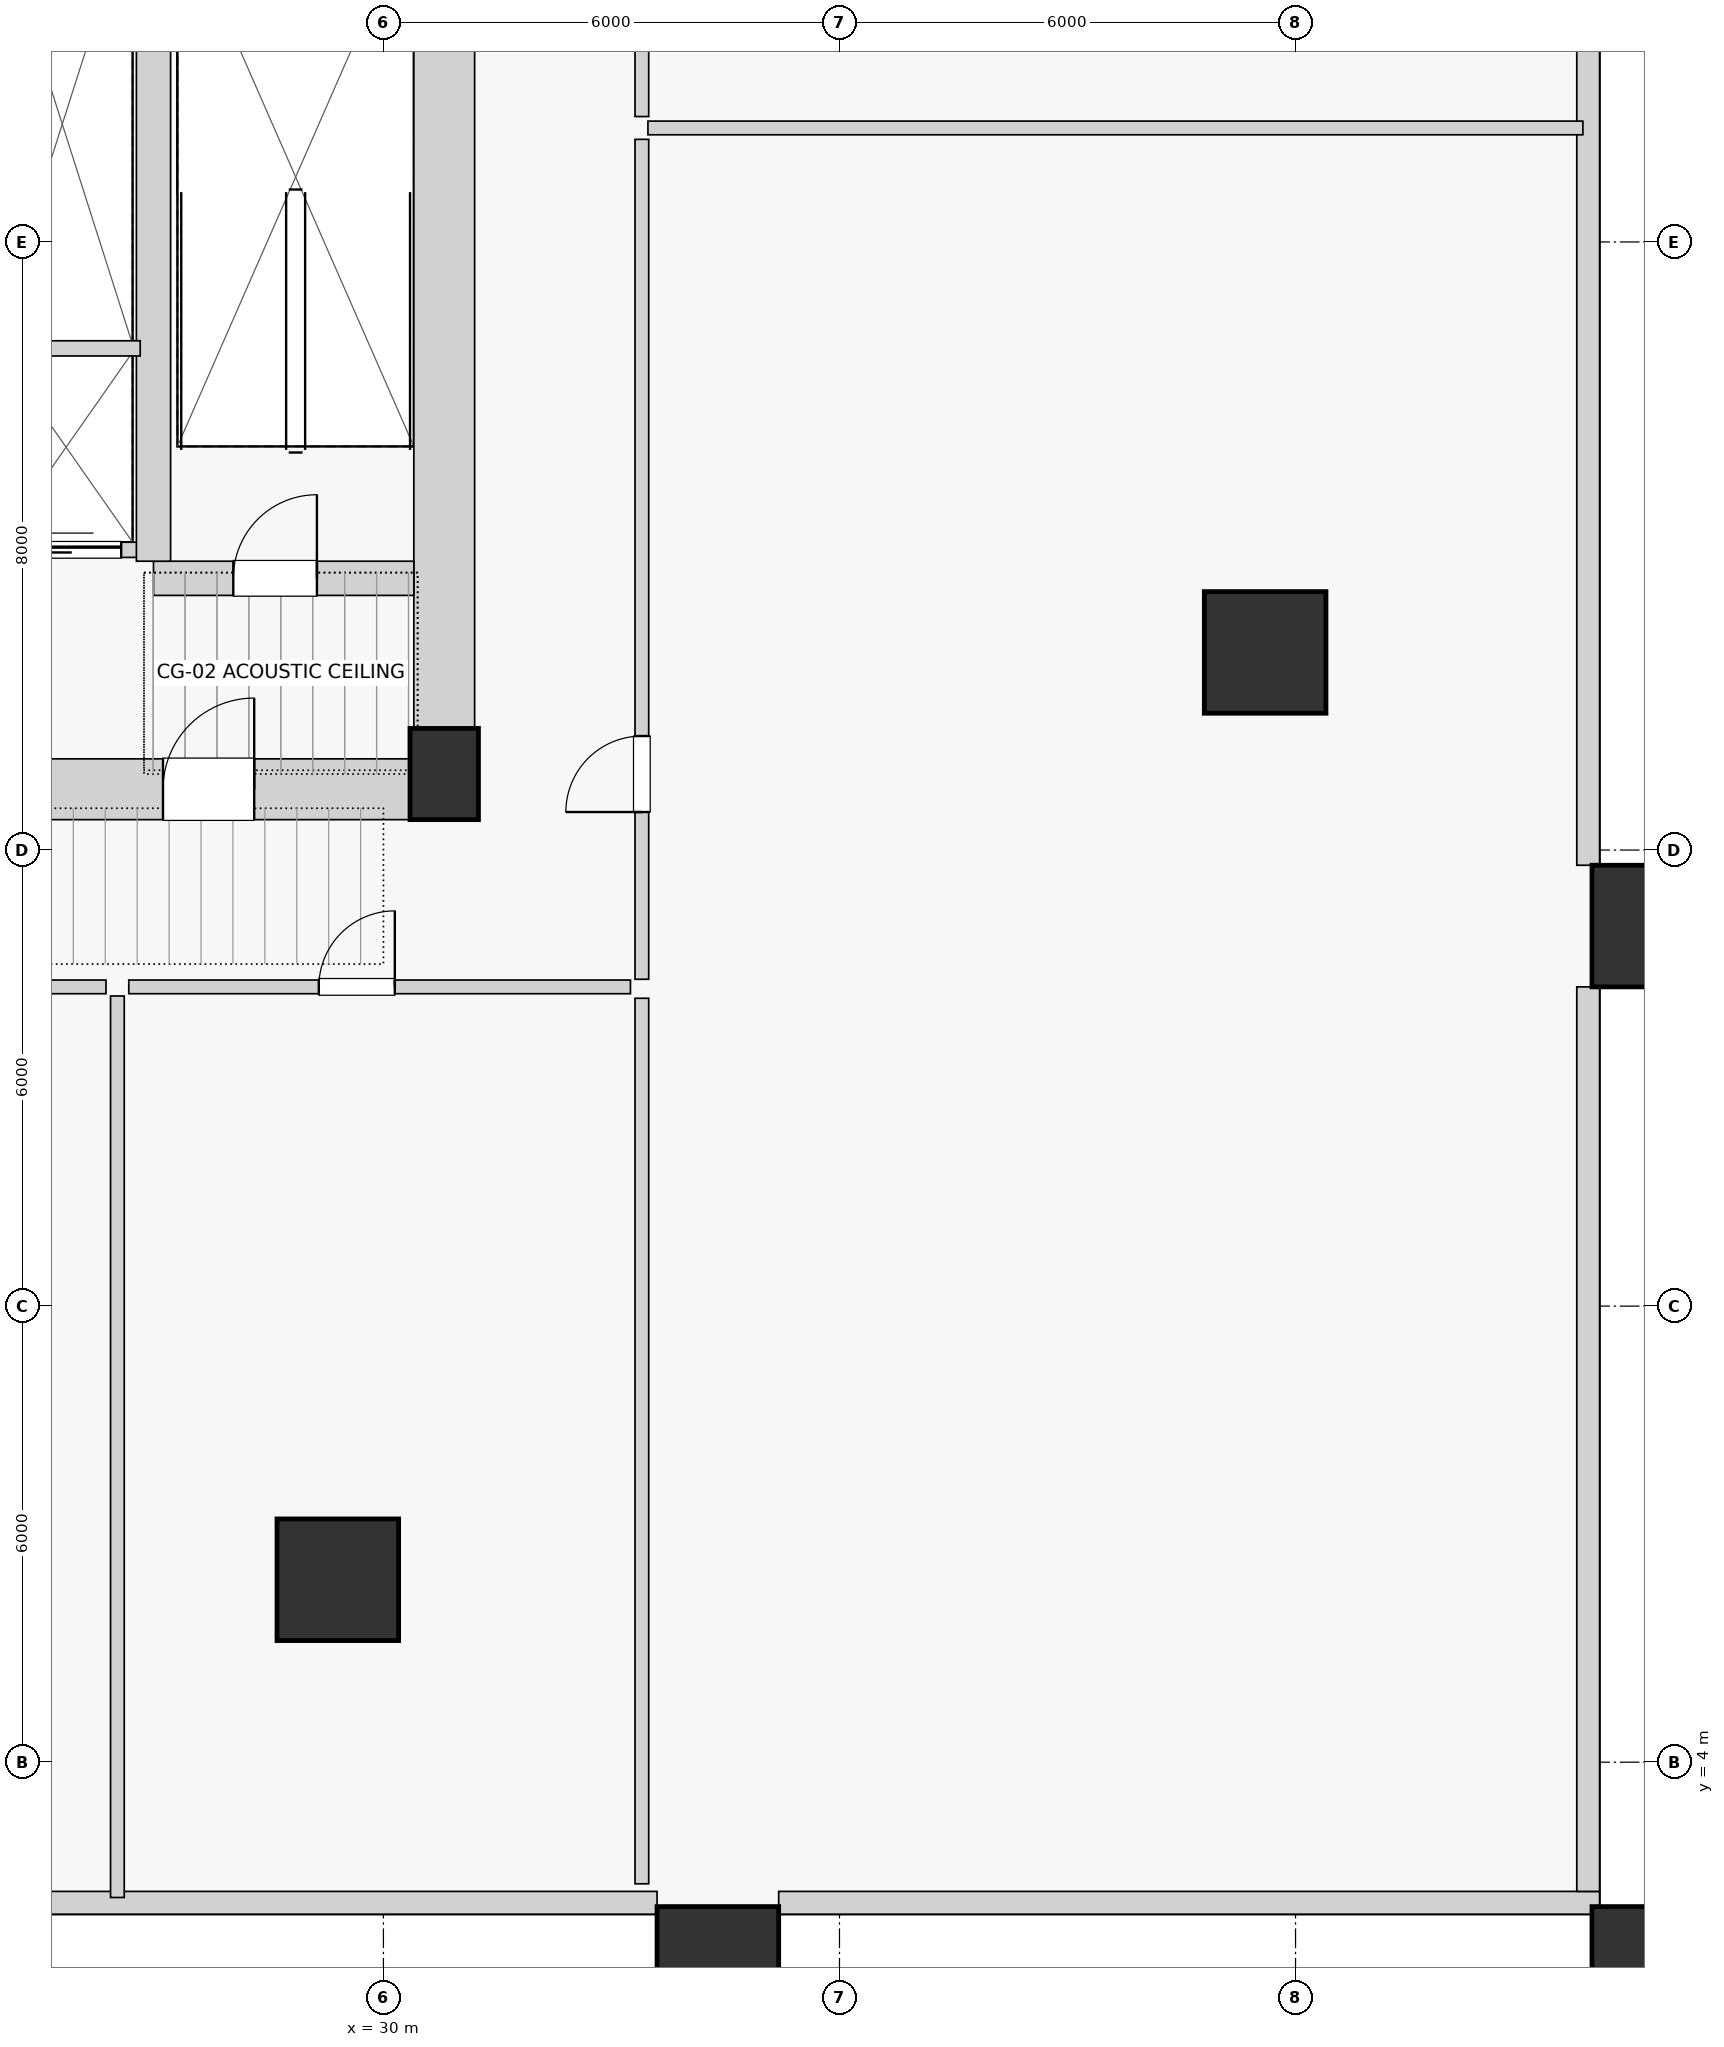
"""IFC4 building model, lengths in metres.
Left out: names, types, materials, properties, quantities, classifications, styles, units other than length and angle.
Written with IfcOpenShell. Run it as: python <this file> out.ifc"""

import sys

from ifc_helpers import new_model, si_unit, direction, frame, frame_2d, origin, origin_2d, place, context, subcontext, project, spatial, rectangle, extrude, source, transform, mapped, element, fill, save


model = new_model("IFC4")
c1 = context("Model", 3, precision=1e-05, world=origin(), true_north=direction((0.0, 1.0)))
c2 = subcontext(c1, "Body", "Model", "MODEL_VIEW")
j1 = project(units=[si_unit("LENGTHUNIT", "METRE"), si_unit("PLANEANGLEUNIT", "RADIAN")], contexts=[c1])
p1 = place(None, origin())
s1 = spatial("IfcSite", under=j1, at=p1, CompositionType="ELEMENT")
p2 = place(p1, origin())
s2 = spatial("IfcBuilding", under=s1, at=p2, CompositionType="ELEMENT")
p3 = place(p2, frame((0.0, 0.0, 18.4)))
s3 = spatial("IfcBuildingStorey", under=s2, at=p3, CompositionType="ELEMENT", Elevation=18.4)
p4 = place(p3, frame((30.8, 17.0, 0.0), z_axis=(0.0, 0.0, 1.0), x_axis=(1.0, 0.0, 0.0)))
e1 = element("IfcColumn", 1, at=p4, inside=s3, PredefinedType="PILASTER", context=c2, shape_type="SweptSolid", body=[
    extrude(rectangle(XDim=0.9, YDim=1.2, at=origin_2d()), origin(), (0.0, 0.0, 1.0), 4.4),
])
for number, where, z_axis, x_axis in (
    (2, (34.4, 1.3, 0.0), (0.0, 0.0, 1.0), (1.0, 0.0, 0.0)),
    (3, (46.7, 1.3, 0.0), (0.0, 0.0, 1.0), (1.0, 0.0, 0.0)),
    (4, (46.7, 15.0, 0.0), (0.0, 0.0, 1.0), (1.0, 0.0, 0.0)),
    (5, (41.6, 18.6, 0.0), (0.0, 0.0, 1.0), (1.0, 0.0, 0.0)),
    (6, (29.4, 6.4, 0.0), (0.0, 0.0, 1.0), (1.0, 0.0, 0.0)),
):
    element("IfcColumn", number, at=place(p3, frame(where, z_axis=z_axis, x_axis=x_axis)), inside=s3, PredefinedType="COLUMN", context=c2, shape_type="SweptSolid", body=[
        extrude(rectangle(XDim=1.6, YDim=1.6, at=origin_2d()), origin(), (0.0, 0.0, 1.0), 4.4),
    ])
p5 = place(p3, frame((24.8, 2.15, 0.0), z_axis=(0.0, 0.0, 1.0), x_axis=(1.0, 0.0, 0.0)))
e7 = element("IfcWall", 7, at=p5, inside=s3, PredefinedType="SOLIDWALL", context=c2, shape_type="SweptSolid", body=[
    extrude(rectangle(XDim=8.8, YDim=0.3, at=frame_2d((4.4, 0.0))), origin(), (0.0, 0.0, 1.0), 2.95),
])
p6 = place(p5, frame((3.35, 0.0, 0.85)))
e8 = element("IfcOpeningElement", 8, at=p6, cuts=e7, PredefinedType="OPENING", context=c2, shape_type="SweptSolid", body=[
    extrude(rectangle(XDim=2.1, YDim=1.75, at=frame_2d((1.05, 0.875))), frame((0.0, 0.16, 0.0), z_axis=(0.0, -1.0, 0.0), x_axis=(1.0, 0.0, 0.0)), (0.0, 0.0, 1.0), 0.32),
])
p7 = place(p3, frame((35.2, 2.15, 0.0), z_axis=(0.0, 0.0, 1.0), x_axis=(1.0, 0.0, 0.0)))
e9 = element("IfcWall", 9, at=p7, inside=s3, PredefinedType="SOLIDWALL", context=c2, shape_type="SweptSolid", body=[
    extrude(rectangle(XDim=10.8, YDim=0.3, at=frame_2d((5.4, 0.0))), origin(), (0.0, 0.0, 1.0), 2.95),
])
p8 = place(p7, frame((4.05, 0.0, 0.85)))
e10 = element("IfcOpeningElement", 10, at=p8, cuts=e9, PredefinedType="OPENING", context=c2, shape_type="SweptSolid", body=[
    extrude(rectangle(XDim=2.1, YDim=1.75, at=frame_2d((1.05, 0.875))), frame((0.0, 0.16, 0.0), z_axis=(0.0, -1.0, 0.0), x_axis=(1.0, 0.0, 0.0)), (0.0, 0.0, 1.0), 0.32),
])
p9 = place(p3, frame((45.85, 2.3, 0.0), z_axis=(0.0, 0.0, 1.0), x_axis=(0.0, 1.0, 0.0)))
e11 = element("IfcWall", 11, at=p9, inside=s3, PredefinedType="SOLIDWALL", context=c2, shape_type="SweptSolid", body=[
    extrude(rectangle(XDim=11.9, YDim=0.3, at=frame_2d((5.95, 0.0))), origin(), (0.0, 0.0, 1.0), 2.95),
])
p10 = place(p9, frame((5.05, 0.0, 0.85)))
e12 = element("IfcOpeningElement", 12, at=p10, cuts=e11, PredefinedType="OPENING", context=c2, shape_type="SweptSolid", body=[
    extrude(rectangle(XDim=2.1, YDim=1.75, at=frame_2d((1.05, 0.875))), frame((0.0, 0.16, 0.0), z_axis=(0.0, -1.0, 0.0), x_axis=(1.0, 0.0, 0.0)), (0.0, 0.0, 1.0), 0.32),
])
p11 = place(p3, frame((45.85, 15.8, 0.0), z_axis=(0.0, 0.0, 1.0), x_axis=(0.0, 1.0, 0.0)))
e13 = element("IfcWall", 13, at=p11, inside=s3, PredefinedType="SOLIDWALL", context=c2, shape_type="SweptSolid", body=[
    extrude(rectangle(XDim=16.4, YDim=0.3, at=frame_2d((8.2, 0.0))), origin(), (0.0, 0.0, 1.0), 2.95),
])
p12 = place(p11, frame((7.15, 0.0, 0.85)))
e14 = element("IfcOpeningElement", 14, at=p12, cuts=e13, PredefinedType="OPENING", context=c2, shape_type="SweptSolid", body=[
    extrude(rectangle(XDim=2.1, YDim=1.75, at=frame_2d((1.05, 0.875))), frame((0.0, 0.16, 0.0), z_axis=(0.0, -1.0, 0.0), x_axis=(1.0, 0.0, 0.0)), (0.0, 0.0, 1.0), 0.32),
])
p13 = place(p3, frame((30.8, 16.8, 0.0), z_axis=(0.0, 0.0, 1.0), x_axis=(0.0, 1.0, 0.0)))
e15 = element("IfcWall", 15, at=p13, inside=s3, PredefinedType="SHEAR", context=c2, shape_type="SweptSolid", body=[
    extrude(rectangle(XDim=14.2, YDim=0.8, at=frame_2d((7.1, 0.0))), origin(), (0.0, 0.0, 1.0), 4.05),
])
p14 = place(p3, frame((24.95, 16.8, 0.0), z_axis=(0.0, 0.0, 1.0), x_axis=(1.0, 0.0, 0.0)))
e16 = element("IfcWall", 16, at=p14, inside=s3, PredefinedType="SHEAR", context=c2, shape_type="SweptSolid", body=[
    extrude(rectangle(XDim=5.85, YDim=0.8, at=frame_2d((2.925, 0.0))), origin(), (0.0, 0.0, 1.0), 4.05),
])
p15 = place(p14, frame((2.15, 0.0, 0.0)))
e17 = element("IfcOpeningElement", 17, at=p15, cuts=e16, PredefinedType="OPENING", context=c2, shape_type="SweptSolid", body=[
    extrude(rectangle(XDim=1.2, YDim=2.03, at=frame_2d((0.6, 1.015))), frame((0.0, 0.41, 0.0), z_axis=(0.0, -1.0, 0.0), x_axis=(1.0, 0.0, 0.0)), (0.0, 0.0, 1.0), 0.82),
])
p16 = place(p3, frame((24.95, 19.95, 0.0), z_axis=(0.0, 0.0, 1.0), x_axis=(1.0, 0.0, 0.0)))
e18 = element("IfcWall", 18, at=p16, inside=s3, PredefinedType="SOLIDWALL", context=c2, shape_type="SweptSolid", body=[
    extrude(rectangle(XDim=1.85, YDim=0.2, at=frame_2d((0.925, 0.0))), origin(), (0.0, 0.0, 1.0), 4.05),
])
p17 = place(p16, frame((0.3, 0.0, 0.0)))
e19 = element("IfcOpeningElement", 19, at=p17, cuts=e18, PredefinedType="OPENING", context=c2, shape_type="SweptSolid", body=[
    extrude(rectangle(XDim=1.3, YDim=2.25, at=frame_2d((0.65, 1.125))), frame((0.0, 0.11, 0.0), z_axis=(0.0, -1.0, 0.0), x_axis=(1.0, 0.0, 0.0)), (0.0, 0.0, 1.0), 0.22),
])
p18 = place(p3, frame((26.975, 19.575, 0.0), z_axis=(0.0, 0.0, 1.0), x_axis=(1.0, 0.0, 0.0)))
e20 = element("IfcWall", 20, at=p18, inside=s3, PredefinedType="SHEAR", context=c2, shape_type="SweptSolid", body=[
    extrude(rectangle(XDim=3.425, YDim=0.45, at=frame_2d((1.712, 0.0))), origin(), (0.0, 0.0, 1.0), 4.05),
])
p19 = place(p18, frame((1.05, 0.0, 0.0)))
e21 = element("IfcOpeningElement", 21, at=p19, cuts=e20, PredefinedType="OPENING", context=c2, shape_type="SweptSolid", body=[
    extrude(rectangle(XDim=1.1, YDim=2.03, at=frame_2d((0.55, 1.015))), frame((0.0, 0.235, 0.0), z_axis=(0.0, -1.0, 0.0), x_axis=(1.0, 0.0, 0.0)), (0.0, 0.0, 1.0), 0.47),
])
p20 = place(p3, frame((26.975, 19.8, 0.0), z_axis=(0.0, 0.0, 1.0), x_axis=(0.0, 1.0, 0.0)))
e22 = element("IfcWall", 22, at=p20, inside=s3, PredefinedType="SHEAR", context=c2, shape_type="SweptSolid", body=[
    extrude(rectangle(XDim=8.825, YDim=0.45, at=frame_2d((4.413, 0.0))), origin(), (0.0, 0.0, 1.0), 4.05),
])
p21 = place(p3, frame((24.85, 22.6, 0.0), z_axis=(0.0, 0.0, 1.0), x_axis=(1.0, 0.0, 0.0)))
e23 = element("IfcWall", 23, at=p21, inside=s3, PredefinedType="SOLIDWALL", context=c2, shape_type="SweptSolid", body=[
    extrude(rectangle(XDim=1.95, YDim=0.2, at=frame_2d((0.975, 0.0))), origin(), (0.0, 0.0, 1.0), 4.05),
])
p22 = place(p3, frame((14.75, 14.2, 0.0), z_axis=(0.0, 0.0, 1.0), x_axis=(1.0, 0.0, 0.0)))
e24 = element("IfcWall", 24, at=p22, inside=s3, PredefinedType="PARTITIONING", context=c2, shape_type="SweptSolid", body=[
    extrude(rectangle(XDim=11.6, YDim=0.18, at=frame_2d((5.8, 0.0))), origin(), (0.0, 0.0, 1.0), 4.05),
])
p23 = place(p22, frame((2.5, 0.0, 0.0)))
e25 = element("IfcOpeningElement", 25, at=p23, cuts=e24, PredefinedType="OPENING", context=c2, shape_type="SweptSolid", body=[
    extrude(rectangle(XDim=1.0, YDim=2.01, at=frame_2d((0.5, 1.005))), frame((0.0, 0.1, 0.0), z_axis=(0.0, -1.0, 0.0), x_axis=(1.0, 0.0, 0.0)), (0.0, 0.0, 1.0), 0.2),
])
p24 = place(p3, frame((26.65, 14.2, 0.0), z_axis=(0.0, 0.0, 1.0), x_axis=(1.0, 0.0, 0.0)))
e26 = element("IfcWall", 26, at=p24, inside=s3, PredefinedType="PARTITIONING", context=c2, shape_type="SweptSolid", body=[
    extrude(rectangle(XDim=6.6, YDim=0.18, at=frame_2d((3.3, 0.0))), origin(), (0.0, 0.0, 1.0), 4.05),
])
p25 = place(p24, frame((2.5, 0.0, 0.0)))
e27 = element("IfcOpeningElement", 27, at=p25, cuts=e26, PredefinedType="OPENING", context=c2, shape_type="SweptSolid", body=[
    extrude(rectangle(XDim=1.0, YDim=2.01, at=frame_2d((0.5, 1.005))), frame((0.0, 0.1, 0.0), z_axis=(0.0, -1.0, 0.0), x_axis=(1.0, 0.0, 0.0)), (0.0, 0.0, 1.0), 0.2),
])
p26 = place(p3, frame((26.5, 2.22, 0.0), z_axis=(0.0, 0.0, 1.0), x_axis=(0.0, 1.0, 0.0)))
e28 = element("IfcWall", 28, at=p26, inside=s3, PredefinedType="PARTITIONING", context=c2, shape_type="SweptSolid", body=[
    extrude(rectangle(XDim=11.86, YDim=0.18, at=frame_2d((5.93, 0.0))), origin(), (0.0, 0.0, 1.0), 4.05),
])
p27 = place(p3, frame((33.4, 2.4, 0.0), z_axis=(0.0, 0.0, 1.0), x_axis=(0.0, 1.0, 0.0)))
e29 = element("IfcWall", 29, at=p27, inside=s3, PredefinedType="PARTITIONING", context=c2, shape_type="SweptSolid", body=[
    extrude(rectangle(XDim=11.65, YDim=0.18, at=frame_2d((5.825, 0.0))), origin(), (0.0, 0.0, 1.0), 4.05),
])
p28 = place(p3, frame((33.4, 14.3, 0.0), z_axis=(0.0, 0.0, 1.0), x_axis=(0.0, 1.0, 0.0)))
e30 = element("IfcWall", 30, at=p28, inside=s3, PredefinedType="PARTITIONING", context=c2, shape_type="SweptSolid", body=[
    extrude(rectangle(XDim=11.05, YDim=0.18, at=frame_2d((5.525, 0.0))), origin(), (0.0, 0.0, 1.0), 4.05),
])
p29 = place(p28, frame((2.2, 0.0, 0.0)))
e31 = element("IfcOpeningElement", 31, at=p29, cuts=e30, PredefinedType="OPENING", context=c2, shape_type="SweptSolid", body=[
    extrude(rectangle(XDim=1.0, YDim=2.01, at=frame_2d((0.5, 1.005))), frame((0.0, 0.1, 0.0), z_axis=(0.0, -1.0, 0.0), x_axis=(1.0, 0.0, 0.0)), (0.0, 0.0, 1.0), 0.2),
])
p30 = place(p3, frame((33.4, 25.65, 0.0), z_axis=(0.0, 0.0, 1.0), x_axis=(0.0, 1.0, 0.0)))
e32 = element("IfcWall", 32, at=p30, inside=s3, PredefinedType="PARTITIONING", context=c2, shape_type="SweptSolid", body=[
    extrude(rectangle(XDim=7.85, YDim=0.18, at=frame_2d((3.925, 0.0))), origin(), (0.0, 0.0, 1.0), 4.05),
])
p31 = place(p30, frame((2.2, 0.0, 0.0)))
e33 = element("IfcOpeningElement", 33, at=p31, cuts=e32, PredefinedType="OPENING", context=c2, shape_type="SweptSolid", body=[
    extrude(rectangle(XDim=1.0, YDim=2.01, at=frame_2d((0.5, 1.005))), frame((0.0, 0.1, 0.0), z_axis=(0.0, -1.0, 0.0), x_axis=(1.0, 0.0, 0.0)), (0.0, 0.0, 1.0), 0.2),
])
p32 = place(p3, frame((33.48, 25.5, 0.0), z_axis=(0.0, 0.0, 1.0), x_axis=(1.0, 0.0, 0.0)))
e34 = element("IfcWall", 34, at=p32, inside=s3, PredefinedType="PARTITIONING", context=c2, shape_type="SweptSolid", body=[
    extrude(rectangle(XDim=12.3, YDim=0.18, at=frame_2d((6.15, 0.0))), origin(), (0.0, 0.0, 1.0), 4.05),
])
m1 = source(origin(), c2, "Body", "SweptSolid", [
    extrude(rectangle(XDim=2.1, YDim=1.75, at=frame_2d((1.05, 0.875))), frame((0.0, 0.03, 0.0), z_axis=(0.0, -1.0, 0.0), x_axis=(1.0, 0.0, 0.0)), (0.0, 0.0, 1.0), 0.06),
])
p33 = place(p6, origin())
e35 = element("IfcWindow", 35, at=p33, inside=s3, PartitioningType="DOUBLE_PANEL_VERTICAL", PredefinedType="WINDOW", context=c2, shape_type="MappedRepresentation", body=[
    mapped(m1, transform((0.0, 0.0, 0.0), scale=1.0)),
])
fill(e8, e35)
p34 = place(p8, origin())
e36 = element("IfcWindow", 36, at=p34, inside=s3, PartitioningType="DOUBLE_PANEL_VERTICAL", PredefinedType="WINDOW", context=c2, shape_type="MappedRepresentation", body=[
    mapped(m1, transform((0.0, 0.0, 0.0), scale=1.0)),
])
fill(e10, e36)
p35 = place(p10, origin())
e37 = element("IfcWindow", 37, at=p35, inside=s3, PartitioningType="DOUBLE_PANEL_VERTICAL", PredefinedType="WINDOW", context=c2, shape_type="MappedRepresentation", body=[
    mapped(m1, transform((0.0, 0.0, 0.0), scale=1.0)),
])
fill(e12, e37)
p36 = place(p12, origin())
e38 = element("IfcWindow", 38, at=p36, inside=s3, PartitioningType="DOUBLE_PANEL_VERTICAL", PredefinedType="WINDOW", context=c2, shape_type="MappedRepresentation", body=[
    mapped(m1, transform((0.0, 0.0, 0.0), scale=1.0)),
])
fill(e14, e38)
m2 = source(origin(), c2, "Body", "SweptSolid", [
    extrude(rectangle(XDim=1.2, YDim=2.03, at=frame_2d((0.6, 1.015))), frame((0.0, 0.025, 0.0), z_axis=(0.0, -1.0, 0.0), x_axis=(1.0, 0.0, 0.0)), (0.0, 0.0, 1.0), 0.05),
])
p37 = place(p15, origin())
e39 = element("IfcDoor", 39, at=p37, inside=s3, OperationType="SINGLE_SWING_RIGHT", PredefinedType="DOOR", context=c2, shape_type="MappedRepresentation", body=[
    mapped(m2, transform((0.0, 0.0, 0.0), scale=1.0)),
])
fill(e17, e39)
m3 = source(origin(), c2, "Body", "SweptSolid", [
    extrude(rectangle(XDim=1.3, YDim=2.25, at=frame_2d((0.65, 1.125))), frame((0.0, 0.025, 0.0), z_axis=(0.0, -1.0, 0.0), x_axis=(1.0, 0.0, 0.0)), (0.0, 0.0, 1.0), 0.05),
])
p38 = place(p17, origin())
e40 = element("IfcDoor", 40, at=p38, inside=s3, OperationType="SLIDING_TO_LEFT", PredefinedType="DOOR", context=c2, shape_type="MappedRepresentation", body=[
    mapped(m3, transform((0.0, 0.0, 0.0), scale=1.0)),
])
fill(e19, e40)
m4 = source(origin(), c2, "Body", "SweptSolid", [
    extrude(rectangle(XDim=1.1, YDim=2.03, at=frame_2d((0.55, 1.015))), frame((0.0, 0.025, 0.0), z_axis=(0.0, -1.0, 0.0), x_axis=(1.0, 0.0, 0.0)), (0.0, 0.0, 1.0), 0.05),
])
p39 = place(p19, origin())
e41 = element("IfcDoor", 41, at=p39, inside=s3, OperationType="SINGLE_SWING_RIGHT", PredefinedType="DOOR", context=c2, shape_type="MappedRepresentation", body=[
    mapped(m4, transform((0.0, 0.0, 0.0), scale=1.0)),
])
fill(e21, e41)
m5 = source(origin(), c2, "Body", "SweptSolid", [
    extrude(rectangle(XDim=1.0, YDim=2.01, at=frame_2d((0.5, 1.005))), frame((0.0, 0.025, 0.0), z_axis=(0.0, -1.0, 0.0), x_axis=(1.0, 0.0, 0.0)), (0.0, 0.0, 1.0), 0.05),
])
p40 = place(p25, origin())
e42 = element("IfcDoor", 42, at=p40, inside=s3, OperationType="SINGLE_SWING_RIGHT", PredefinedType="DOOR", context=c2, shape_type="MappedRepresentation", body=[
    mapped(m5, transform((0.0, 0.0, 0.0), scale=1.0)),
])
fill(e27, e42)
p41 = place(p29, origin())
e43 = element("IfcDoor", 43, at=p41, inside=s3, OperationType="SINGLE_SWING_LEFT", PredefinedType="DOOR", context=c2, shape_type="MappedRepresentation", body=[
    mapped(m5, transform((0.0, 0.0, 0.0), scale=1.0)),
])
fill(e31, e43)
save(model, sys.argv[1])
